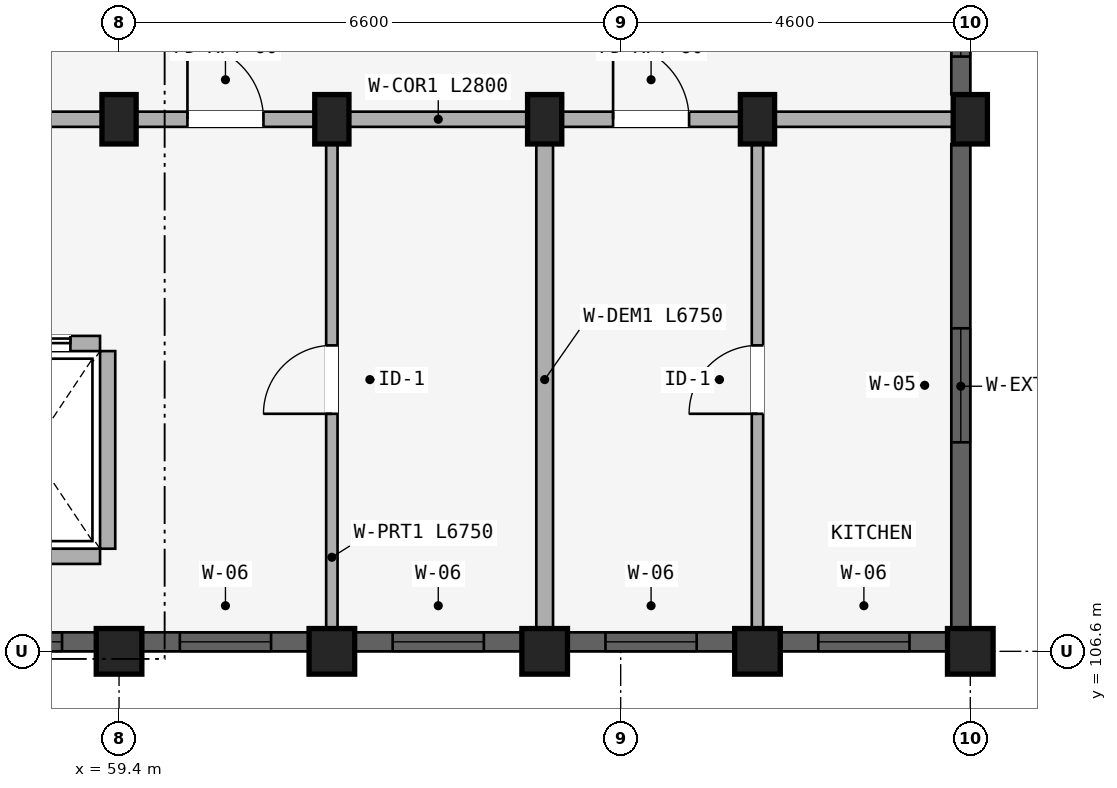
"""IFC4 building model, lengths in metres.
Left out: names, types, materials, properties, quantities, classifications, styles, units other than length and angle.
Written with IfcOpenShell. Run it as: python <this file> out.ifc"""

import sys

from ifc_helpers import new_model, si_unit, direction, frame, frame_2d, origin, origin_2d, place, context, subcontext, project, spatial, rectangle, extrude, element, fill, save


model = new_model("IFC4")
c1 = context("Model", 3, precision=1e-05, world=origin(), true_north=direction((0.0, 1.0)))
c2 = subcontext(c1, "Body", "Model", "MODEL_VIEW")
j1 = project(units=[si_unit("LENGTHUNIT", "METRE"), si_unit("PLANEANGLEUNIT", "RADIAN")], contexts=[c1])
p1 = place(None, origin())
s1 = spatial("IfcSite", under=j1, at=p1, CompositionType="ELEMENT")
p2 = place(p1, origin())
s2 = spatial("IfcBuilding", under=s1, at=p2, CompositionType="ELEMENT")
p3 = place(p2, frame((0.0, 0.0, 30.75)))
s3 = spatial("IfcBuildingStorey", under=s2, at=p3, CompositionType="ELEMENT", Elevation=30.75)
p4 = place(p3, frame((59.4, 106.6, 0.0), z_axis=(0.0, 0.0, 1.0), x_axis=(1.0, 0.0, 0.0)))
e1 = element("IfcColumn", 1, at=p4, inside=s3, PredefinedType="COLUMN", context=c2, shape_type="SweptSolid", body=[
    extrude(rectangle(XDim=0.6, YDim=0.6, at=origin_2d()), origin(), (0.0, 0.0, 1.0), 2.93),
])
p5 = place(p3, frame((59.4, 113.6, 0.0), z_axis=(0.0, 0.0, 1.0), x_axis=(1.0, 0.0, 0.0)))
e2 = element("IfcColumn", 2, at=p5, inside=s3, PredefinedType="COLUMN", context=c2, shape_type="SweptSolid", body=[
    extrude(rectangle(XDim=0.45, YDim=0.65, at=origin_2d()), origin(), (0.0, 0.0, 1.0), 2.93),
])
p6 = place(p3, frame((62.2, 106.6, 0.0), z_axis=(0.0, 0.0, 1.0), x_axis=(1.0, 0.0, 0.0)))
e3 = element("IfcColumn", 3, at=p6, inside=s3, PredefinedType="COLUMN", context=c2, shape_type="SweptSolid", body=[
    extrude(rectangle(XDim=0.6, YDim=0.6, at=origin_2d()), origin(), (0.0, 0.0, 1.0), 2.93),
])
p7 = place(p3, frame((62.2, 113.6, 0.0), z_axis=(0.0, 0.0, 1.0), x_axis=(1.0, 0.0, 0.0)))
e4 = element("IfcColumn", 4, at=p7, inside=s3, PredefinedType="COLUMN", context=c2, shape_type="SweptSolid", body=[
    extrude(rectangle(XDim=0.45, YDim=0.65, at=origin_2d()), origin(), (0.0, 0.0, 1.0), 2.93),
])
p8 = place(p3, frame((65.0, 106.6, 0.0), z_axis=(0.0, 0.0, 1.0), x_axis=(1.0, 0.0, 0.0)))
e5 = element("IfcColumn", 5, at=p8, inside=s3, PredefinedType="COLUMN", context=c2, shape_type="SweptSolid", body=[
    extrude(rectangle(XDim=0.6, YDim=0.6, at=origin_2d()), origin(), (0.0, 0.0, 1.0), 2.93),
])
p9 = place(p3, frame((65.0, 113.6, 0.0), z_axis=(0.0, 0.0, 1.0), x_axis=(1.0, 0.0, 0.0)))
e6 = element("IfcColumn", 6, at=p9, inside=s3, PredefinedType="COLUMN", context=c2, shape_type="SweptSolid", body=[
    extrude(rectangle(XDim=0.45, YDim=0.65, at=origin_2d()), origin(), (0.0, 0.0, 1.0), 2.93),
])
p10 = place(p3, frame((67.8, 106.6, 0.0), z_axis=(0.0, 0.0, 1.0), x_axis=(1.0, 0.0, 0.0)))
e7 = element("IfcColumn", 7, at=p10, inside=s3, PredefinedType="COLUMN", context=c2, shape_type="SweptSolid", body=[
    extrude(rectangle(XDim=0.6, YDim=0.6, at=origin_2d()), origin(), (0.0, 0.0, 1.0), 2.93),
])
p11 = place(p3, frame((67.8, 113.6, 0.0), z_axis=(0.0, 0.0, 1.0), x_axis=(1.0, 0.0, 0.0)))
e8 = element("IfcColumn", 8, at=p11, inside=s3, PredefinedType="COLUMN", context=c2, shape_type="SweptSolid", body=[
    extrude(rectangle(XDim=0.45, YDim=0.65, at=origin_2d()), origin(), (0.0, 0.0, 1.0), 2.93),
])
p12 = place(p3, frame((70.6, 106.6, 0.0), z_axis=(0.0, 0.0, 1.0), x_axis=(1.0, 0.0, 0.0)))
e9 = element("IfcColumn", 9, at=p12, inside=s3, PredefinedType="COLUMN", context=c2, shape_type="SweptSolid", body=[
    extrude(rectangle(XDim=0.6, YDim=0.6, at=origin_2d()), origin(), (0.0, 0.0, 1.0), 2.93),
])
p13 = place(p3, frame((70.6, 113.6, 0.0), z_axis=(0.0, 0.0, 1.0), x_axis=(1.0, 0.0, 0.0)))
e10 = element("IfcColumn", 10, at=p13, inside=s3, PredefinedType="COLUMN", context=c2, shape_type="SweptSolid", body=[
    extrude(rectangle(XDim=0.45, YDim=0.65, at=origin_2d()), origin(), (0.0, 0.0, 1.0), 2.93),
])
p14 = place(p3, frame((59.25, 107.95, 0.0), z_axis=(0.0, 0.0, 1.0), x_axis=(0.0, 1.0, 0.0)))
e11 = element("IfcWall", 11, at=p14, inside=s3, PredefinedType="STANDARD", context=c2, shape_type="SweptSolid", body=[
    extrude(rectangle(XDim=2.6, YDim=0.2, at=frame_2d((1.3, 0.0))), origin(), (0.0, 0.0, 1.0), 2.372),
])
p15 = place(p3, frame((57.35, 107.85, 0.0), z_axis=(0.0, 0.0, 1.0), x_axis=(1.0, 0.0, 0.0)))
e12 = element("IfcWall", 12, at=p15, inside=s3, PredefinedType="STANDARD", context=c2, shape_type="SweptSolid", body=[
    extrude(rectangle(XDim=1.8, YDim=0.2, at=frame_2d((0.9, 0.0))), origin(), (0.0, 0.0, 1.0), 2.93),
])
p16 = place(p3, frame((57.35, 110.65, 0.0), z_axis=(0.0, 0.0, 1.0), x_axis=(1.0, 0.0, 0.0)))
e13 = element("IfcWall", 13, at=p16, inside=s3, PredefinedType="STANDARD", context=c2, shape_type="SweptSolid", body=[
    extrude(rectangle(XDim=1.8, YDim=0.2, at=frame_2d((0.9, 0.0))), origin(), (0.0, 0.0, 1.0), 2.93),
])
p17 = place(p16, frame((0.39, 0.0, 0.0)))
e14 = element("IfcOpeningElement", 14, at=p17, cuts=e13, PredefinedType="OPENING", context=c2, shape_type="SweptSolid", body=[
    extrude(rectangle(XDim=1.02, YDim=2.15, at=frame_2d((0.51, 1.075))), frame((0.0, 0.11, 0.0), z_axis=(0.0, -1.0, 0.0), x_axis=(1.0, 0.0, 0.0)), (0.0, 0.0, 1.0), 0.22),
])
p18 = place(p3, frame((53.75, 113.6, 0.0), z_axis=(0.0, 0.0, 1.0), x_axis=(1.0, 0.0, 0.0)))
e15 = element("IfcWall", 15, at=p18, inside=s3, PredefinedType="STANDARD", context=c2, shape_type="SweptSolid", body=[
    extrude(rectangle(XDim=5.6, YDim=0.2, at=frame_2d((2.8, 0.0))), origin(), (0.0, 0.0, 1.0), 2.372),
])
p19 = place(p18, frame((1.91, 0.0, 0.0)))
e16 = element("IfcOpeningElement", 16, at=p19, cuts=e15, PredefinedType="OPENING", context=c2, shape_type="SweptSolid", body=[
    extrude(rectangle(XDim=1.22, YDim=2.15, at=frame_2d((0.61, 1.075))), frame((0.0, 0.11, 0.0), z_axis=(0.0, -1.0, 0.0), x_axis=(1.0, 0.0, 0.0)), (0.0, 0.0, 1.0), 0.22),
])
p20 = place(p3, frame((59.4, 113.6, 0.0), z_axis=(0.0, 0.0, 1.0), x_axis=(1.0, 0.0, 0.0)))
e17 = element("IfcWall", 17, at=p20, inside=s3, PredefinedType="STANDARD", context=c2, shape_type="SweptSolid", body=[
    extrude(rectangle(XDim=2.8, YDim=0.2, at=frame_2d((1.4, 0.0))), origin(), (0.0, 0.0, 1.0), 2.372),
])
p21 = place(p20, frame((0.9, 0.0, 0.0)))
e18 = element("IfcOpeningElement", 18, at=p21, cuts=e17, PredefinedType="OPENING", context=c2, shape_type="SweptSolid", body=[
    extrude(rectangle(XDim=1.0, YDim=2.15, at=frame_2d((0.5, 1.075))), frame((0.0, 0.11, 0.0), z_axis=(0.0, -1.0, 0.0), x_axis=(1.0, 0.0, 0.0)), (0.0, 0.0, 1.0), 0.22),
])
p22 = place(p3, frame((62.2, 113.6, 0.0), z_axis=(0.0, 0.0, 1.0), x_axis=(1.0, 0.0, 0.0)))
e19 = element("IfcWall", 19, at=p22, inside=s3, PredefinedType="STANDARD", context=c2, shape_type="SweptSolid", body=[
    extrude(rectangle(XDim=2.8, YDim=0.2, at=frame_2d((1.4, 0.0))), origin(), (0.0, 0.0, 1.0), 2.372),
])
p23 = place(p3, frame((65.0, 113.6, 0.0), z_axis=(0.0, 0.0, 1.0), x_axis=(1.0, 0.0, 0.0)))
e20 = element("IfcWall", 20, at=p23, inside=s3, PredefinedType="STANDARD", context=c2, shape_type="SweptSolid", body=[
    extrude(rectangle(XDim=2.8, YDim=0.2, at=frame_2d((1.4, 0.0))), origin(), (0.0, 0.0, 1.0), 2.372),
])
p24 = place(p23, frame((0.9, 0.0, 0.0)))
e21 = element("IfcOpeningElement", 21, at=p24, cuts=e20, PredefinedType="OPENING", context=c2, shape_type="SweptSolid", body=[
    extrude(rectangle(XDim=1.0, YDim=2.15, at=frame_2d((0.5, 1.075))), frame((0.0, 0.11, 0.0), z_axis=(0.0, -1.0, 0.0), x_axis=(1.0, 0.0, 0.0)), (0.0, 0.0, 1.0), 0.22),
])
p25 = place(p3, frame((67.8, 113.6, 0.0), z_axis=(0.0, 0.0, 1.0), x_axis=(1.0, 0.0, 0.0)))
e22 = element("IfcWall", 22, at=p25, inside=s3, PredefinedType="STANDARD", context=c2, shape_type="SweptSolid", body=[
    extrude(rectangle(XDim=2.8, YDim=0.2, at=frame_2d((1.4, 0.0))), origin(), (0.0, 0.0, 1.0), 2.372),
])
p26 = place(p3, frame((62.2, 106.8, 0.0), z_axis=(0.0, 0.0, 1.0), x_axis=(0.0, 1.0, 0.0)))
e23 = element("IfcWall", 23, at=p26, inside=s3, PredefinedType="PARTITIONING", context=c2, shape_type="SweptSolid", body=[
    extrude(rectangle(XDim=6.75, YDim=0.15, at=frame_2d((3.375, 0.0))), origin(), (0.0, 0.0, 1.0), 2.372),
])
p27 = place(p26, frame((2.925, 0.0, 0.0)))
e24 = element("IfcOpeningElement", 24, at=p27, cuts=e23, PredefinedType="OPENING", context=c2, shape_type="SweptSolid", body=[
    extrude(rectangle(XDim=0.9, YDim=2.1, at=frame_2d((0.45, 1.05))), frame((0.0, 0.085, 0.0), z_axis=(0.0, -1.0, 0.0), x_axis=(1.0, 0.0, 0.0)), (0.0, 0.0, 1.0), 0.17),
])
p28 = place(p3, frame((65.0, 106.8, 0.0), z_axis=(0.0, 0.0, 1.0), x_axis=(0.0, 1.0, 0.0)))
e25 = element("IfcWall", 25, at=p28, inside=s3, PredefinedType="STANDARD", context=c2, shape_type="SweptSolid", body=[
    extrude(rectangle(XDim=6.75, YDim=0.22, at=frame_2d((3.375, 0.0))), origin(), (0.0, 0.0, 1.0), 2.372),
])
p29 = place(p3, frame((67.8, 106.8, 0.0), z_axis=(0.0, 0.0, 1.0), x_axis=(0.0, 1.0, 0.0)))
e26 = element("IfcWall", 26, at=p29, inside=s3, PredefinedType="PARTITIONING", context=c2, shape_type="SweptSolid", body=[
    extrude(rectangle(XDim=6.75, YDim=0.15, at=frame_2d((3.375, 0.0))), origin(), (0.0, 0.0, 1.0), 2.372),
])
p30 = place(p29, frame((2.925, 0.0, 0.0)))
e27 = element("IfcOpeningElement", 27, at=p30, cuts=e26, PredefinedType="OPENING", context=c2, shape_type="SweptSolid", body=[
    extrude(rectangle(XDim=0.9, YDim=2.1, at=frame_2d((0.45, 1.05))), frame((0.0, 0.085, 0.0), z_axis=(0.0, -1.0, 0.0), x_axis=(1.0, 0.0, 0.0)), (0.0, 0.0, 1.0), 0.17),
])
p31 = place(p3, frame((56.628, 106.725, 0.0), z_axis=(0.0, 0.0, 1.0), x_axis=(1.0, 0.0, 0.0)))
e28 = element("IfcWall", 28, at=p31, inside=s3, PredefinedType="STANDARD", context=c2, shape_type="SweptSolid", body=[
    extrude(rectangle(XDim=2.468, YDim=0.25, at=frame_2d((1.234, 0.0))), origin(), (0.0, 0.0, 1.0), 2.472),
])
p32 = place(p31, frame((0.822, 0.0, 0.772)))
e29 = element("IfcOpeningElement", 29, at=p32, cuts=e28, PredefinedType="OPENING", context=c2, shape_type="SweptSolid", body=[
    extrude(rectangle(XDim=1.2, YDim=1.5, at=frame_2d((0.6, 0.75))), frame((0.0, 0.135, 0.0), z_axis=(0.0, -1.0, 0.0), x_axis=(1.0, 0.0, 0.0)), (0.0, 0.0, 1.0), 0.27),
])
p33 = place(p3, frame((59.704, 106.725, 0.0), z_axis=(0.0, 0.0, 1.0), x_axis=(1.0, 0.0, 0.0)))
e30 = element("IfcWall", 30, at=p33, inside=s3, PredefinedType="STANDARD", context=c2, shape_type="SweptSolid", body=[
    extrude(rectangle(XDim=2.193, YDim=0.25, at=frame_2d((1.096, 0.0))), origin(), (0.0, 0.0, 1.0), 2.472),
])
p34 = place(p33, frame((0.497, 0.0, 0.772)))
e31 = element("IfcOpeningElement", 31, at=p34, cuts=e30, PredefinedType="OPENING", context=c2, shape_type="SweptSolid", body=[
    extrude(rectangle(XDim=1.2, YDim=1.5, at=frame_2d((0.6, 0.75))), frame((0.0, 0.135, 0.0), z_axis=(0.0, -1.0, 0.0), x_axis=(1.0, 0.0, 0.0)), (0.0, 0.0, 1.0), 0.27),
])
p35 = place(p3, frame((62.503, 106.725, 0.0), z_axis=(0.0, 0.0, 1.0), x_axis=(1.0, 0.0, 0.0)))
e32 = element("IfcWall", 32, at=p35, inside=s3, PredefinedType="STANDARD", context=c2, shape_type="SweptSolid", body=[
    extrude(rectangle(XDim=2.193, YDim=0.25, at=frame_2d((1.097, 0.0))), origin(), (0.0, 0.0, 1.0), 2.472),
])
p36 = place(p35, frame((0.497, 0.0, 0.772)))
e33 = element("IfcOpeningElement", 33, at=p36, cuts=e32, PredefinedType="OPENING", context=c2, shape_type="SweptSolid", body=[
    extrude(rectangle(XDim=1.2, YDim=1.5, at=frame_2d((0.6, 0.75))), frame((0.0, 0.135, 0.0), z_axis=(0.0, -1.0, 0.0), x_axis=(1.0, 0.0, 0.0)), (0.0, 0.0, 1.0), 0.27),
])
p37 = place(p3, frame((65.303, 106.725, 0.0), z_axis=(0.0, 0.0, 1.0), x_axis=(1.0, 0.0, 0.0)))
e34 = element("IfcWall", 34, at=p37, inside=s3, PredefinedType="STANDARD", context=c2, shape_type="SweptSolid", body=[
    extrude(rectangle(XDim=2.193, YDim=0.25, at=frame_2d((1.097, 0.0))), origin(), (0.0, 0.0, 1.0), 2.472),
])
p38 = place(p37, frame((0.497, 0.0, 0.772)))
e35 = element("IfcOpeningElement", 35, at=p38, cuts=e34, PredefinedType="OPENING", context=c2, shape_type="SweptSolid", body=[
    extrude(rectangle(XDim=1.2, YDim=1.5, at=frame_2d((0.6, 0.75))), frame((0.0, 0.135, 0.0), z_axis=(0.0, -1.0, 0.0), x_axis=(1.0, 0.0, 0.0)), (0.0, 0.0, 1.0), 0.27),
])
p39 = place(p3, frame((68.104, 106.725, 0.0), z_axis=(0.0, 0.0, 1.0), x_axis=(1.0, 0.0, 0.0)))
e36 = element("IfcWall", 36, at=p39, inside=s3, PredefinedType="STANDARD", context=c2, shape_type="SweptSolid", body=[
    extrude(rectangle(XDim=2.193, YDim=0.25, at=frame_2d((1.096, 0.0))), origin(), (0.0, 0.0, 1.0), 2.472),
])
p40 = place(p39, frame((0.497, 0.0, 0.772)))
e37 = element("IfcOpeningElement", 37, at=p40, cuts=e36, PredefinedType="OPENING", context=c2, shape_type="SweptSolid", body=[
    extrude(rectangle(XDim=1.2, YDim=1.5, at=frame_2d((0.6, 0.75))), frame((0.0, 0.135, 0.0), z_axis=(0.0, -1.0, 0.0), x_axis=(1.0, 0.0, 0.0)), (0.0, 0.0, 1.0), 0.27),
])
p41 = place(p3, frame((70.475, 106.904, 0.0), z_axis=(0.0, 0.0, 1.0), x_axis=(0.0, 1.0, 0.0)))
e38 = element("IfcWall", 38, at=p41, inside=s3, PredefinedType="STANDARD", context=c2, shape_type="SweptSolid", body=[
    extrude(rectangle(XDim=6.368, YDim=0.25, at=frame_2d((3.184, 0.0))), origin(), (0.0, 0.0, 1.0), 2.372),
])
p42 = place(p41, frame((2.447, 0.0, 0.522)))
e39 = element("IfcOpeningElement", 39, at=p42, cuts=e38, PredefinedType="OPENING", context=c2, shape_type="SweptSolid", body=[
    extrude(rectangle(XDim=1.5, YDim=1.65, at=frame_2d((0.75, 0.825))), frame((0.0, 0.135, 0.0), z_axis=(0.0, -1.0, 0.0), x_axis=(1.0, 0.0, 0.0)), (0.0, 0.0, 1.0), 0.27),
])
p43 = place(p3, frame((70.475, 113.928, 0.0), z_axis=(0.0, 0.0, 1.0), x_axis=(0.0, 1.0, 0.0)))
e40 = element("IfcWall", 40, at=p43, inside=s3, PredefinedType="STANDARD", context=c2, shape_type="SweptSolid", body=[
    extrude(rectangle(XDim=1.743, YDim=0.25, at=frame_2d((0.872, 0.0))), origin(), (0.0, 0.0, 1.0), 2.372),
])
p44 = place(p43, frame((0.497, 0.0, 0.88)))
e41 = element("IfcOpeningElement", 41, at=p44, cuts=e40, PredefinedType="OPENING", context=c2, shape_type="SweptSolid", body=[
    extrude(rectangle(XDim=0.75, YDim=1.05, at=frame_2d((0.375, 0.525))), frame((0.0, 0.135, 0.0), z_axis=(0.0, -1.0, 0.0), x_axis=(1.0, 0.0, 0.0)), (0.0, 0.0, 1.0), 0.27),
])
p45 = place(p32, origin())
e42 = element("IfcWindow", 42, at=p45, inside=s3, PartitioningType="SINGLE_PANEL", PredefinedType="WINDOW", context=c2, shape_type="SweptSolid", body=[
    extrude(rectangle(XDim=1.2, YDim=1.5, at=frame_2d((0.6, 0.75))), frame((0.0, 0.03, 0.0), z_axis=(0.0, -1.0, 0.0), x_axis=(1.0, 0.0, 0.0)), (0.0, 0.0, 1.0), 0.06),
])
fill(e29, e42)
p46 = place(p34, origin())
e43 = element("IfcWindow", 43, at=p46, inside=s3, PartitioningType="SINGLE_PANEL", PredefinedType="WINDOW", context=c2, shape_type="SweptSolid", body=[
    extrude(rectangle(XDim=1.2, YDim=1.5, at=frame_2d((0.6, 0.75))), frame((0.0, 0.03, 0.0), z_axis=(0.0, -1.0, 0.0), x_axis=(1.0, 0.0, 0.0)), (0.0, 0.0, 1.0), 0.06),
])
fill(e31, e43)
p47 = place(p36, origin())
e44 = element("IfcWindow", 44, at=p47, inside=s3, PartitioningType="SINGLE_PANEL", PredefinedType="WINDOW", context=c2, shape_type="SweptSolid", body=[
    extrude(rectangle(XDim=1.2, YDim=1.5, at=frame_2d((0.6, 0.75))), frame((0.0, 0.03, 0.0), z_axis=(0.0, -1.0, 0.0), x_axis=(1.0, 0.0, 0.0)), (0.0, 0.0, 1.0), 0.06),
])
fill(e33, e44)
p48 = place(p38, origin())
e45 = element("IfcWindow", 45, at=p48, inside=s3, PartitioningType="SINGLE_PANEL", PredefinedType="WINDOW", context=c2, shape_type="SweptSolid", body=[
    extrude(rectangle(XDim=1.2, YDim=1.5, at=frame_2d((0.6, 0.75))), frame((0.0, 0.03, 0.0), z_axis=(0.0, -1.0, 0.0), x_axis=(1.0, 0.0, 0.0)), (0.0, 0.0, 1.0), 0.06),
])
fill(e35, e45)
p49 = place(p40, origin())
e46 = element("IfcWindow", 46, at=p49, inside=s3, PartitioningType="SINGLE_PANEL", PredefinedType="WINDOW", context=c2, shape_type="SweptSolid", body=[
    extrude(rectangle(XDim=1.2, YDim=1.5, at=frame_2d((0.6, 0.75))), frame((0.0, 0.03, 0.0), z_axis=(0.0, -1.0, 0.0), x_axis=(1.0, 0.0, 0.0)), (0.0, 0.0, 1.0), 0.06),
])
fill(e37, e46)
p50 = place(p42, origin())
e47 = element("IfcWindow", 47, at=p50, inside=s3, PartitioningType="DOUBLE_PANEL_VERTICAL", PredefinedType="WINDOW", context=c2, shape_type="SweptSolid", body=[
    extrude(rectangle(XDim=1.5, YDim=1.65, at=frame_2d((0.75, 0.825))), frame((0.0, 0.03, 0.0), z_axis=(0.0, -1.0, 0.0), x_axis=(1.0, 0.0, 0.0)), (0.0, 0.0, 1.0), 0.06),
])
fill(e39, e47)
p51 = place(p44, origin())
e48 = element("IfcWindow", 48, at=p51, inside=s3, PartitioningType="SINGLE_PANEL", PredefinedType="WINDOW", context=c2, shape_type="SweptSolid", body=[
    extrude(rectangle(XDim=0.75, YDim=1.05, at=frame_2d((0.375, 0.525))), frame((0.0, 0.03, 0.0), z_axis=(0.0, -1.0, 0.0), x_axis=(1.0, 0.0, 0.0)), (0.0, 0.0, 1.0), 0.06),
])
fill(e41, e48)
p52 = place(p17, origin())
e49 = element("IfcDoor", 49, at=p52, inside=s3, OperationType="SLIDING_TO_RIGHT", PredefinedType="DOOR", context=c2, shape_type="SweptSolid", body=[
    extrude(rectangle(XDim=1.02, YDim=2.15, at=frame_2d((0.51, 1.075))), frame((0.0, 0.025, 0.0), z_axis=(0.0, -1.0, 0.0), x_axis=(1.0, 0.0, 0.0)), (0.0, 0.0, 1.0), 0.05),
])
fill(e14, e49)
p53 = place(p21, frame((1.0, 0.0, 0.0), z_axis=(0.0, 0.0, 1.0), x_axis=(-1.0, 0.0, 0.0)))
e50 = element("IfcDoor", 50, at=p53, inside=s3, OperationType="SINGLE_SWING_RIGHT", PredefinedType="DOOR", context=c2, shape_type="SweptSolid", body=[
    extrude(rectangle(XDim=1.0, YDim=2.15, at=frame_2d((0.5, 1.075))), frame((0.0, 0.025, 0.0), z_axis=(0.0, -1.0, 0.0), x_axis=(1.0, 0.0, 0.0)), (0.0, 0.0, 1.0), 0.05),
])
fill(e18, e50)
p54 = place(p24, frame((1.0, 0.0, 0.0), z_axis=(0.0, 0.0, 1.0), x_axis=(-1.0, 0.0, 0.0)))
e51 = element("IfcDoor", 51, at=p54, inside=s3, OperationType="SINGLE_SWING_RIGHT", PredefinedType="DOOR", context=c2, shape_type="SweptSolid", body=[
    extrude(rectangle(XDim=1.0, YDim=2.15, at=frame_2d((0.5, 1.075))), frame((0.0, 0.025, 0.0), z_axis=(0.0, -1.0, 0.0), x_axis=(1.0, 0.0, 0.0)), (0.0, 0.0, 1.0), 0.05),
])
fill(e21, e51)
p55 = place(p27, origin())
e52 = element("IfcDoor", 52, at=p55, inside=s3, OperationType="SINGLE_SWING_LEFT", PredefinedType="DOOR", context=c2, shape_type="SweptSolid", body=[
    extrude(rectangle(XDim=0.9, YDim=2.1, at=frame_2d((0.45, 1.05))), frame((0.0, 0.025, 0.0), z_axis=(0.0, -1.0, 0.0), x_axis=(1.0, 0.0, 0.0)), (0.0, 0.0, 1.0), 0.05),
])
fill(e24, e52)
p56 = place(p30, frame((0.9, 0.0, 0.0), z_axis=(0.0, 0.0, 1.0), x_axis=(-1.0, 0.0, 0.0)))
e53 = element("IfcDoor", 53, at=p56, inside=s3, OperationType="SINGLE_SWING_RIGHT", PredefinedType="DOOR", context=c2, shape_type="SweptSolid", body=[
    extrude(rectangle(XDim=0.9, YDim=2.1, at=frame_2d((0.45, 1.05))), frame((0.0, 0.025, 0.0), z_axis=(0.0, -1.0, 0.0), x_axis=(1.0, 0.0, 0.0)), (0.0, 0.0, 1.0), 0.05),
])
fill(e27, e53)
save(model, sys.argv[1])
